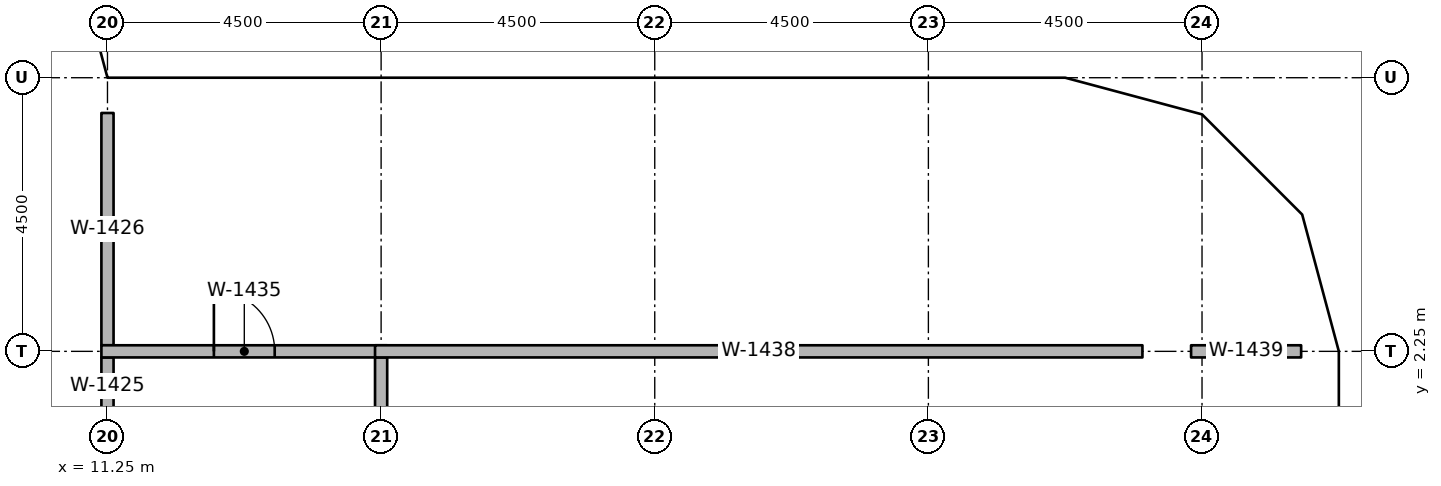
"""IFC4 building model, lengths in metres.
Left out: names, types, materials, properties, quantities, classifications, styles, units other than length and angle.
Written with IfcOpenShell. Run it as: python <this file> out.ifc"""

import sys

from ifc_helpers import new_model, si_unit, direction, frame, frame_2d, origin, origin_2d, place, context, subcontext, project, spatial, rectangle, extrude, element, fill, save


model = new_model("IFC4")
c1 = context("Model", 3, precision=1e-05, world=origin(), true_north=direction((0.0, 1.0)))
c2 = subcontext(c1, "Body", "Model", "MODEL_VIEW")
j1 = project(units=[si_unit("LENGTHUNIT", "METRE"), si_unit("PLANEANGLEUNIT", "RADIAN")], contexts=[c1])
p1 = place(None, origin())
s1 = spatial("IfcSite", under=j1, at=p1, CompositionType="ELEMENT")
p2 = place(p1, origin())
s2 = spatial("IfcBuilding", under=s1, at=p2, CompositionType="ELEMENT")
p3 = place(p2, frame((0.0, 0.0, 141.0)))
s3 = spatial("IfcBuildingStorey", under=s2, at=p3, CompositionType="ELEMENT", Elevation=141.0)
for number, where, z_axis, x_axis in (
    (1, (10.75, 6.25, 0.0), (0.0, 0.0, 1.0), (1.0, 0.0, 0.0)),
    (2, (15.75, 6.25, 0.0), (0.0, 0.0, 1.0), (1.0, 0.0, 0.0)),
    (3, (20.25, 6.11, 0.0), (0.0, 0.0, 1.0), (1.0, 0.0, 0.0)),
    (4, (24.75, 6.11, 0.0), (0.0, 0.0, 1.0), (1.0, 0.0, 0.0)),
    (5, (28.67, 2.25, 0.0), (0.0, 0.0, 1.0), (1.0, 0.0, 0.0)),
    (6, (28.908, 5.475, 0.0), (0.0, 0.0, 1.0), (1.0, 0.0, 0.0)),
):
    element("IfcColumn", number, at=place(p3, frame(where, z_axis=z_axis, x_axis=x_axis)), inside=s3, PredefinedType="COLUMN", context=c2, shape_type="SweptSolid", body=[
        extrude(rectangle(XDim=0.8, YDim=0.8, at=origin_2d()), origin(), (0.0, 0.0, 1.0), 3.65),
    ])
p4 = place(p3, frame((11.25, 1.225, 0.0), z_axis=(0.0, 0.0, 1.0), x_axis=(0.0, 1.0, 0.0)))
e7 = element("IfcWall", 7, at=p4, inside=s3, PredefinedType="PARTITIONING", context=c2, shape_type="SweptSolid", body=[
    extrude(rectangle(XDim=0.925, YDim=0.2, at=frame_2d((0.462, 0.0))), origin(), (0.0, 0.0, 1.0), 2.75),
])
p5 = place(p3, frame((11.25, 2.35, 0.0), z_axis=(0.0, 0.0, 1.0), x_axis=(0.0, 1.0, 0.0)))
e8 = element("IfcWall", 8, at=p5, inside=s3, PredefinedType="PARTITIONING", context=c2, shape_type="SweptSolid", body=[
    extrude(rectangle(XDim=3.82, YDim=0.2, at=frame_2d((1.91, 0.0))), origin(), (0.0, 0.0, 1.0), 2.75),
])
p6 = place(p3, frame((11.15, 2.25, 0.0), z_axis=(0.0, 0.0, 1.0), x_axis=(1.0, 0.0, 0.0)))
e9 = element("IfcWall", 9, at=p6, inside=s3, PredefinedType="PARTITIONING", context=c2, shape_type="SweptSolid", body=[
    extrude(rectangle(XDim=4.7, YDim=0.2, at=frame_2d((2.35, 0.0))), origin(), (0.0, 0.0, 1.0), 2.75),
])
p7 = place(p6, frame((1.85, 0.0, 0.0)))
e10 = element("IfcOpeningElement", 10, at=p7, cuts=e9, PredefinedType="OPENING", context=c2, shape_type="SweptSolid", body=[
    extrude(rectangle(XDim=1.0, YDim=2.1, at=frame_2d((0.5, 1.05))), frame((0.0, 0.11, 0.0), z_axis=(0.0, -1.0, 0.0), x_axis=(1.0, 0.0, 0.0)), (0.0, 0.0, 1.0), 0.22),
])
p8 = place(p3, frame((15.75, 2.15, 0.0), z_axis=(0.0, 0.0, 1.0), x_axis=(0.0, -1.0, 0.0)))
e11 = element("IfcWall", 11, at=p8, inside=s3, PredefinedType="PARTITIONING", context=c2, shape_type="SweptSolid", body=[
    extrude(rectangle(XDim=4.3, YDim=0.2, at=frame_2d((2.15, 0.0))), origin(), (0.0, 0.0, 1.0), 2.75),
])
p9 = place(p8, frame((1.65, 0.0, 0.0)))
e12 = element("IfcOpeningElement", 12, at=p9, cuts=e11, PredefinedType="OPENING", context=c2, shape_type="SweptSolid", body=[
    extrude(rectangle(XDim=1.0, YDim=2.1, at=frame_2d((0.5, 1.05))), frame((0.0, 0.11, 0.0), z_axis=(0.0, -1.0, 0.0), x_axis=(1.0, 0.0, 0.0)), (0.0, 0.0, 1.0), 0.22),
])
p10 = place(p3, frame((15.65, 2.25, 0.0), z_axis=(0.0, 0.0, 1.0), x_axis=(1.0, 0.0, 0.0)))
e13 = element("IfcWall", 13, at=p10, inside=s3, PredefinedType="PARTITIONING", context=c2, shape_type="SweptSolid", body=[
    extrude(rectangle(XDim=12.62, YDim=0.2, at=frame_2d((6.31, 0.0))), origin(), (0.0, 0.0, 1.0), 2.75),
])
p11 = place(p3, frame((29.07, 2.25, 0.0), z_axis=(0.0, 0.0, 1.0), x_axis=(1.0, 0.0, 0.0)))
e14 = element("IfcWall", 14, at=p11, inside=s3, PredefinedType="PARTITIONING", context=c2, shape_type="SweptSolid", body=[
    extrude(rectangle(XDim=1.81, YDim=0.2, at=frame_2d((0.905, 0.0))), origin(), (0.0, 0.0, 1.0), 2.75),
])
p12 = place(p7, origin())
e15 = element("IfcDoor", 15, at=p12, inside=s3, OperationType="SINGLE_SWING_RIGHT", PredefinedType="DOOR", context=c2, shape_type="SweptSolid", body=[
    extrude(rectangle(XDim=1.0, YDim=2.1, at=frame_2d((0.5, 1.05))), frame((0.0, 0.025, 0.0), z_axis=(0.0, -1.0, 0.0), x_axis=(1.0, 0.0, 0.0)), (0.0, 0.0, 1.0), 0.05),
])
fill(e10, e15)
save(model, sys.argv[1])
